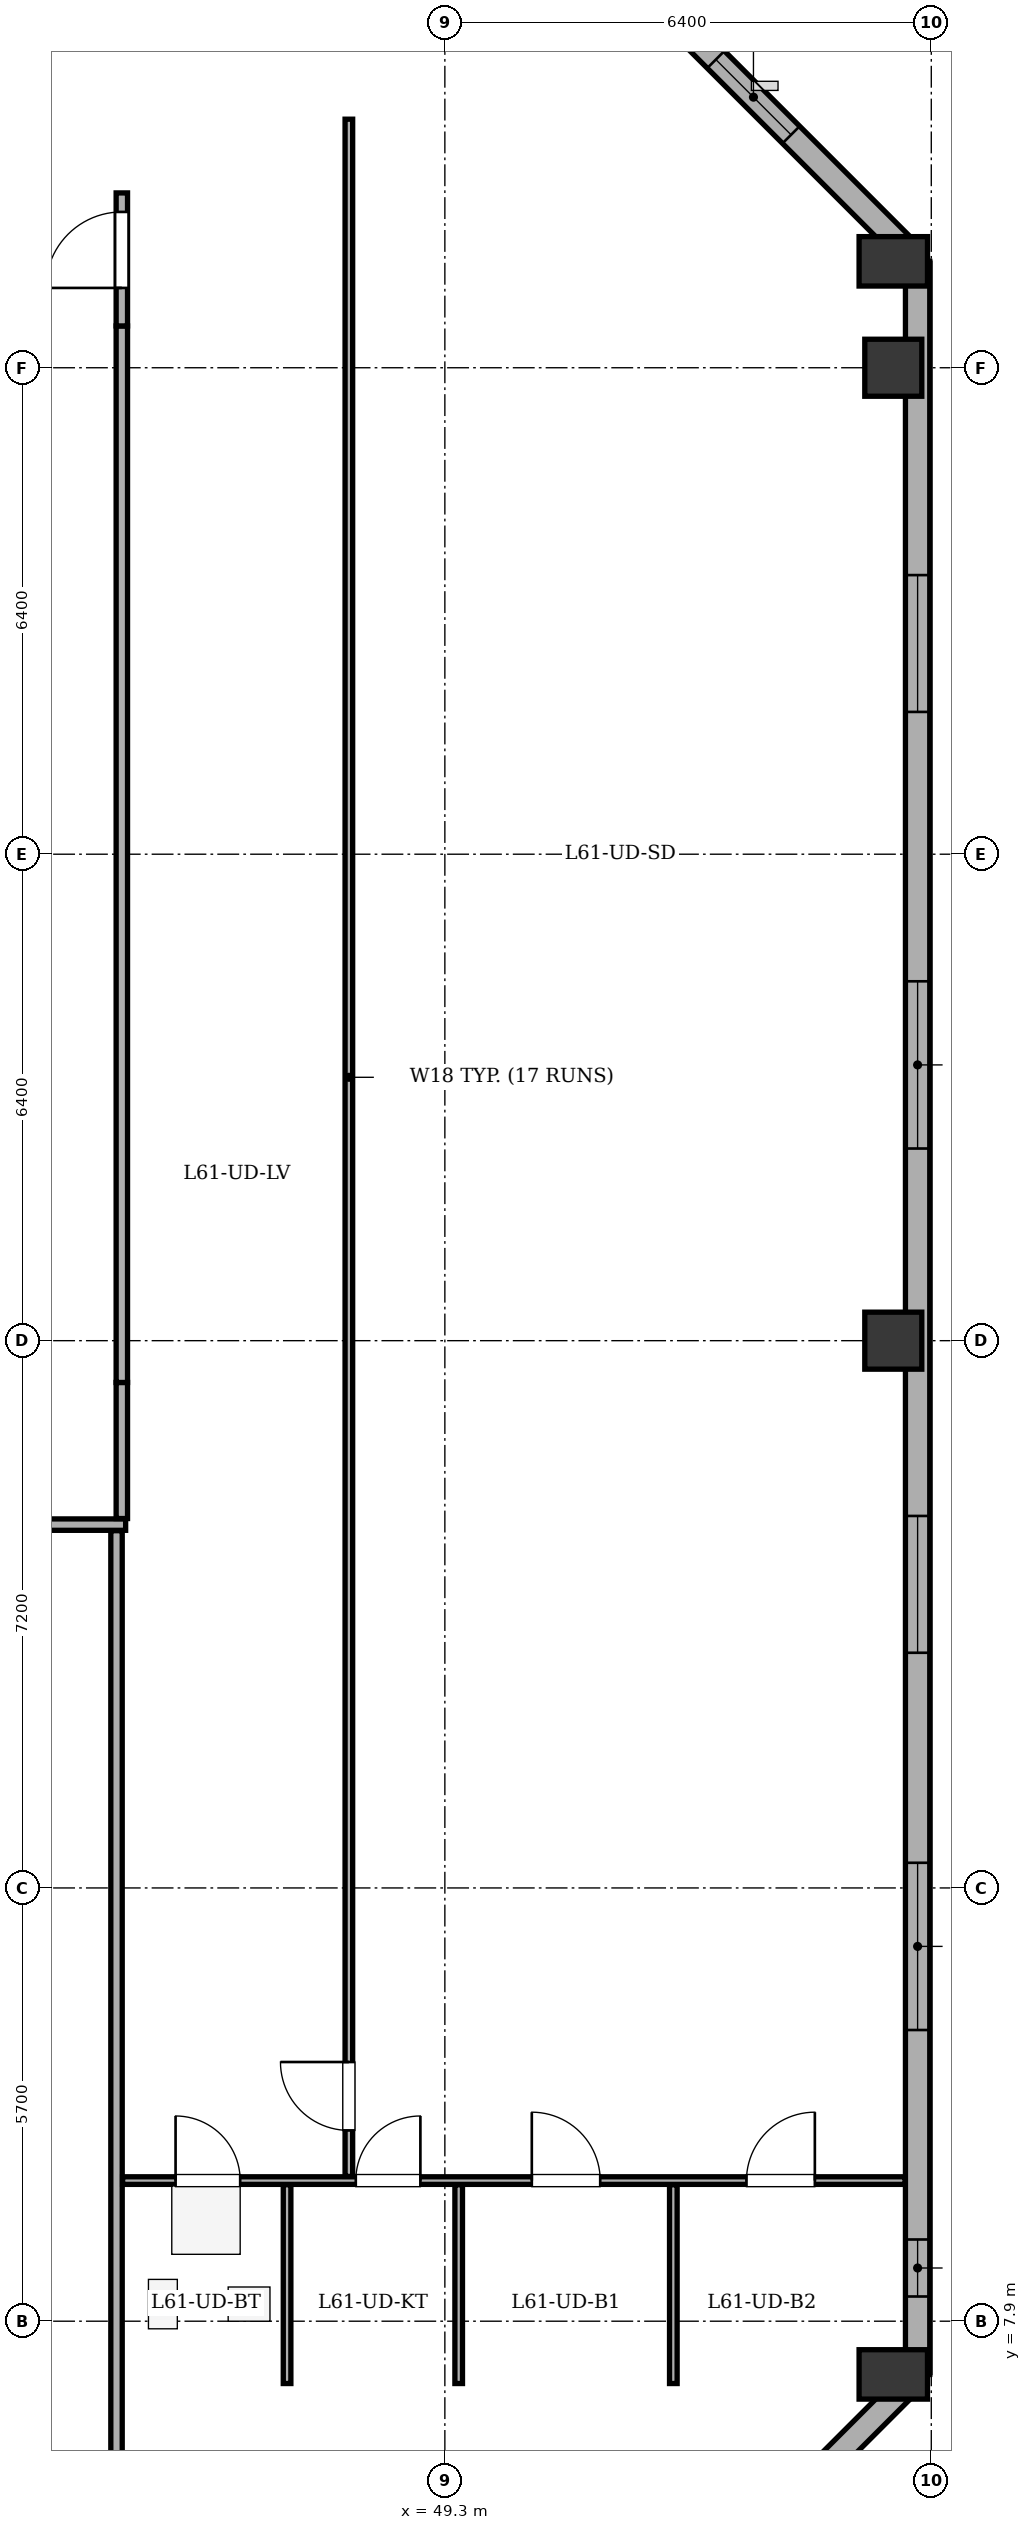
"""IFC4 building model, lengths in metres.
Left out: names, types, materials, properties, quantities, classifications, styles, units other than length and angle.
Written with IfcOpenShell. Run it as: python <this file> out.ifc"""

import sys

from ifc_helpers import new_model, si_unit, direction, frame, frame_2d, origin, origin_2d, place, context, subcontext, project, spatial, rectangle, extrude, element, fill, save


model = new_model("IFC4")
c1 = context("Model", 3, precision=1e-05, world=origin(), true_north=direction((0.0, 1.0)))
c2 = subcontext(c1, "Body", "Model", "MODEL_VIEW")
j1 = project(units=[si_unit("LENGTHUNIT", "METRE"), si_unit("PLANEANGLEUNIT", "RADIAN")], contexts=[c1])
p1 = place(None, origin())
s1 = spatial("IfcSite", under=j1, at=p1, CompositionType="ELEMENT")
p2 = place(p1, origin())
s2 = spatial("IfcBuilding", under=s1, at=p2, CompositionType="ELEMENT")
p3 = place(p2, frame((0.0, 0.0, 234.7)))
s3 = spatial("IfcBuildingStorey", under=s2, at=p3, CompositionType="ELEMENT", Elevation=234.7)
p4 = place(p3, frame((55.2, 7.2, 0.0), z_axis=(0.0, 0.0, 1.0), x_axis=(1.0, 0.0, 0.0)))
e1 = element("IfcColumn", 1, at=p4, inside=s3, PredefinedType="COLUMN", context=c2, shape_type="SweptSolid", body=[
    extrude(rectangle(XDim=0.65, YDim=0.9, at=origin_2d()), origin(), (0.0, 0.0, 1.0), 3.4),
])
for number, where, z_axis, x_axis in (
    (2, (55.2, 20.8, 0.0), (0.0, 0.0, 1.0), (1.0, 0.0, 0.0)),
    (3, (55.2, 33.6, 0.0), (0.0, 0.0, 1.0), (1.0, 0.0, 0.0)),
):
    element("IfcColumn", number, at=place(p3, frame(where, z_axis=z_axis, x_axis=x_axis)), inside=s3, PredefinedType="COLUMN", context=c2, shape_type="SweptSolid", body=[
        extrude(rectangle(XDim=0.75, YDim=0.75, at=origin_2d()), origin(), (0.0, 0.0, 1.0), 3.4),
    ])
p5 = place(p3, frame((55.2, 35.0, 0.0), z_axis=(0.0, 0.0, 1.0), x_axis=(1.0, 0.0, 0.0)))
e4 = element("IfcColumn", 4, at=p5, inside=s3, PredefinedType="COLUMN", context=c2, shape_type="SweptSolid", body=[
    extrude(rectangle(XDim=0.65, YDim=0.9, at=origin_2d()), origin(), (0.0, 0.0, 1.0), 3.4),
])
p6 = place(p3, frame((51.2, 39.32, 0.0), z_axis=(0.0, 0.0, 1.0), x_axis=(0.707106781187, -0.707106781187, 0.0)))
e5 = element("IfcWall", 5, at=p6, inside=s3, PredefinedType="STANDARD", context=c2, shape_type="SweptSolid", body=[
    extrude(rectangle(XDim=6.11, YDim=0.32, at=frame_2d((3.055, 0.0))), origin(), (0.0, 0.0, 1.0), 2.725),
])
p7 = place(p6, frame((2.355, 0.0, 0.75)))
e6 = element("IfcOpeningElement", 6, at=p7, cuts=e5, PredefinedType="OPENING", context=c2, shape_type="SweptSolid", body=[
    extrude(rectangle(XDim=1.4, YDim=1.65, at=frame_2d((0.7, 0.825))), frame((0.0, 0.17, 0.0), z_axis=(0.0, -1.0, 0.0), x_axis=(1.0, 0.0, 0.0)), (0.0, 0.0, 1.0), 0.34),
])
p8 = place(p3, frame((55.52, 35.0, 0.0), z_axis=(0.0, 0.0, 1.0), x_axis=(0.0, -1.0, 0.0)))
e7 = element("IfcWall", 7, at=p8, inside=s3, PredefinedType="STANDARD", context=c2, shape_type="SweptSolid", body=[
    extrude(rectangle(XDim=27.8, YDim=0.32, at=frame_2d((13.9, 0.0))), origin(), (0.0, 0.0, 1.0), 2.725),
])
p9 = place(p8, frame((4.128, 0.0, 0.75)))
e8 = element("IfcOpeningElement", 8, at=p9, cuts=e7, PredefinedType="OPENING", context=c2, shape_type="SweptSolid", body=[
    extrude(rectangle(XDim=1.8, YDim=1.7, at=frame_2d((0.9, 0.85))), frame((0.0, 0.17, 0.0), z_axis=(0.0, -1.0, 0.0), x_axis=(1.0, 0.0, 0.0)), (0.0, 0.0, 1.0), 0.34),
])
p10 = place(p8, frame((9.472, 0.0, 0.75)))
e9 = element("IfcOpeningElement", 9, at=p10, cuts=e7, PredefinedType="OPENING", context=c2, shape_type="SweptSolid", body=[
    extrude(rectangle(XDim=2.2, YDim=1.7, at=frame_2d((1.1, 0.85))), frame((0.0, 0.17, 0.0), z_axis=(0.0, -1.0, 0.0), x_axis=(1.0, 0.0, 0.0)), (0.0, 0.0, 1.0), 0.34),
])
p11 = place(p8, frame((16.506, 0.0, 0.75)))
e10 = element("IfcOpeningElement", 10, at=p11, cuts=e7, PredefinedType="OPENING", context=c2, shape_type="SweptSolid", body=[
    extrude(rectangle(XDim=1.8, YDim=1.7, at=frame_2d((0.9, 0.85))), frame((0.0, 0.17, 0.0), z_axis=(0.0, -1.0, 0.0), x_axis=(1.0, 0.0, 0.0)), (0.0, 0.0, 1.0), 0.34),
])
p12 = place(p8, frame((21.069, 0.0, 0.75)))
e11 = element("IfcOpeningElement", 11, at=p12, cuts=e7, PredefinedType="OPENING", context=c2, shape_type="SweptSolid", body=[
    extrude(rectangle(XDim=2.2, YDim=1.7, at=frame_2d((1.1, 0.85))), frame((0.0, 0.17, 0.0), z_axis=(0.0, -1.0, 0.0), x_axis=(1.0, 0.0, 0.0)), (0.0, 0.0, 1.0), 0.34),
])
p13 = place(p8, frame((26.025, 0.0, 0.75)))
e12 = element("IfcOpeningElement", 12, at=p13, cuts=e7, PredefinedType="OPENING", context=c2, shape_type="SweptSolid", body=[
    extrude(rectangle(XDim=0.75, YDim=1.45, at=frame_2d((0.375, 0.725))), frame((0.0, 0.17, 0.0), z_axis=(0.0, -1.0, 0.0), x_axis=(1.0, 0.0, 0.0)), (0.0, 0.0, 1.0), 0.34),
])
p14 = place(p3, frame((55.52, 7.2, 0.0), z_axis=(0.0, 0.0, 1.0), x_axis=(-0.707106781187, -0.707106781187, 0.0)))
e13 = element("IfcWall", 13, at=p14, inside=s3, PredefinedType="STANDARD", context=c2, shape_type="SweptSolid", body=[
    extrude(rectangle(XDim=6.11, YDim=0.32, at=frame_2d((3.055, 0.0))), origin(), (0.0, 0.0, 1.0), 2.725),
])
p15 = place(p14, frame((2.355, 0.0, 0.75)))
e14 = element("IfcOpeningElement", 14, at=p15, cuts=e13, PredefinedType="OPENING", context=c2, shape_type="SweptSolid", body=[
    extrude(rectangle(XDim=1.4, YDim=1.65, at=frame_2d((0.7, 0.825))), frame((0.0, 0.17, 0.0), z_axis=(0.0, -1.0, 0.0), x_axis=(1.0, 0.0, 0.0)), (0.0, 0.0, 1.0), 0.34),
])
p16 = place(p3, frame((15.08, 18.38, 0.0), z_axis=(0.0, 0.0, 1.0), x_axis=(1.0, 0.0, 0.0)))
e15 = element("IfcWall", 15, at=p16, inside=s3, PredefinedType="PARTITIONING", context=c2, shape_type="SweptSolid", body=[
    extrude(rectangle(XDim=30.02, YDim=0.15, at=frame_2d((15.01, 0.0))), origin(), (0.0, 0.0, 1.0), 3.1),
])
p17 = place(p16, frame((4.385, 0.0, 0.0)))
e16 = element("IfcOpeningElement", 16, at=p17, cuts=e15, PredefinedType="OPENING", context=c2, shape_type="SweptSolid", body=[
    extrude(rectangle(XDim=1.0, YDim=2.1, at=frame_2d((0.5, 1.05))), frame((0.0, 0.085, 0.0), z_axis=(0.0, -1.0, 0.0), x_axis=(1.0, 0.0, 0.0)), (0.0, 0.0, 1.0), 0.17),
])
p18 = place(p16, frame((14.361, 0.0, 0.0)))
e17 = element("IfcOpeningElement", 17, at=p18, cuts=e15, PredefinedType="OPENING", context=c2, shape_type="SweptSolid", body=[
    extrude(rectangle(XDim=1.0, YDim=2.1, at=frame_2d((0.5, 1.05))), frame((0.0, 0.085, 0.0), z_axis=(0.0, -1.0, 0.0), x_axis=(1.0, 0.0, 0.0)), (0.0, 0.0, 1.0), 0.17),
])
p19 = place(p16, frame((24.486, 0.0, 0.0)))
e18 = element("IfcOpeningElement", 18, at=p19, cuts=e15, PredefinedType="OPENING", context=c2, shape_type="SweptSolid", body=[
    extrude(rectangle(XDim=1.0, YDim=2.1, at=frame_2d((0.5, 1.05))), frame((0.0, 0.085, 0.0), z_axis=(0.0, -1.0, 0.0), x_axis=(1.0, 0.0, 0.0)), (0.0, 0.0, 1.0), 0.17),
])
p20 = place(p3, frame((44.98, 3.045, 0.0), z_axis=(0.0, 0.0, 1.0), x_axis=(0.0, 1.0, 0.0)))
e19 = element("IfcWall", 19, at=p20, inside=s3, PredefinedType="PARTITIONING", context=c2, shape_type="SweptSolid", body=[
    extrude(rectangle(XDim=15.255, YDim=0.15, at=frame_2d((7.627, 0.0))), origin(), (0.0, 0.0, 1.0), 2.725),
])
p21 = place(p3, frame((45.05, 18.46, 0.0), z_axis=(0.0, 0.0, 1.0), x_axis=(0.0, 1.0, 0.0)))
e20 = element("IfcWall", 20, at=p21, inside=s3, PredefinedType="PARTITIONING", context=c2, shape_type="SweptSolid", body=[
    extrude(rectangle(XDim=1.79, YDim=0.15, at=frame_2d((0.895, 0.0))), origin(), (0.0, 0.0, 1.0), 2.725),
])
p22 = place(p3, frame((45.05, 20.25, 0.0), z_axis=(0.0, 0.0, 1.0), x_axis=(0.0, 1.0, 0.0)))
e21 = element("IfcWall", 21, at=p22, inside=s3, PredefinedType="PARTITIONING", context=c2, shape_type="SweptSolid", body=[
    extrude(rectangle(XDim=13.9, YDim=0.15, at=frame_2d((6.95, 0.0))), origin(), (0.0, 0.0, 1.0), 2.725),
])
p23 = place(p3, frame((45.05, 34.15, 0.0), z_axis=(0.0, 0.0, 1.0), x_axis=(0.0, 1.0, 0.0)))
e22 = element("IfcWall", 22, at=p23, inside=s3, PredefinedType="PARTITIONING", context=c2, shape_type="SweptSolid", body=[
    extrude(rectangle(XDim=1.75, YDim=0.15, at=frame_2d((0.875, 0.0))), origin(), (0.0, 0.0, 1.0), 2.725),
])
p24 = place(p23, frame((0.5, 0.0, 0.0)))
e23 = element("IfcOpeningElement", 23, at=p24, cuts=e22, PredefinedType="OPENING", context=c2, shape_type="SweptSolid", body=[
    extrude(rectangle(XDim=1.0, YDim=2.1, at=frame_2d((0.5, 1.05))), frame((0.0, 0.085, 0.0), z_axis=(0.0, -1.0, 0.0), x_axis=(1.0, 0.0, 0.0)), (0.0, 0.0, 1.0), 0.17),
])
p25 = place(p3, frame((45.06, 9.75, 0.0), z_axis=(0.0, 0.0, 1.0), x_axis=(1.0, 0.0, 0.0)))
e24 = element("IfcWall", 24, at=p25, inside=s3, PredefinedType="PARTITIONING", context=c2, shape_type="SweptSolid", body=[
    extrude(rectangle(XDim=10.295, YDim=0.1, at=frame_2d((5.147, 0.0))), origin(), (0.0, 0.0, 1.0), 3.1),
])
p26 = place(p25, frame((0.697, 0.0, 0.0)))
e25 = element("IfcOpeningElement", 25, at=p26, cuts=e24, PredefinedType="OPENING", context=c2, shape_type="SweptSolid", body=[
    extrude(rectangle(XDim=0.85, YDim=2.05, at=frame_2d((0.425, 1.025))), frame((0.0, 0.06, 0.0), z_axis=(0.0, -1.0, 0.0), x_axis=(1.0, 0.0, 0.0)), (0.0, 0.0, 1.0), 0.12),
])
p27 = place(p25, frame((3.068, 0.0, 0.0)))
e26 = element("IfcOpeningElement", 26, at=p27, cuts=e24, PredefinedType="OPENING", context=c2, shape_type="SweptSolid", body=[
    extrude(rectangle(XDim=0.85, YDim=2.05, at=frame_2d((0.425, 1.025))), frame((0.0, 0.06, 0.0), z_axis=(0.0, -1.0, 0.0), x_axis=(1.0, 0.0, 0.0)), (0.0, 0.0, 1.0), 0.12),
])
p28 = place(p25, frame((5.384, 0.0, 0.0)))
e27 = element("IfcOpeningElement", 27, at=p28, cuts=e24, PredefinedType="OPENING", context=c2, shape_type="SweptSolid", body=[
    extrude(rectangle(XDim=0.9, YDim=2.05, at=frame_2d((0.45, 1.025))), frame((0.0, 0.06, 0.0), z_axis=(0.0, -1.0, 0.0), x_axis=(1.0, 0.0, 0.0)), (0.0, 0.0, 1.0), 0.12),
])
p29 = place(p25, frame((8.208, 0.0, 0.0)))
e28 = element("IfcOpeningElement", 28, at=p29, cuts=e24, PredefinedType="OPENING", context=c2, shape_type="SweptSolid", body=[
    extrude(rectangle(XDim=0.9, YDim=2.05, at=frame_2d((0.45, 1.025))), frame((0.0, 0.06, 0.0), z_axis=(0.0, -1.0, 0.0), x_axis=(1.0, 0.0, 0.0)), (0.0, 0.0, 1.0), 0.12),
])
p30 = place(p3, frame((48.037, 9.805, 0.0), z_axis=(0.0, 0.0, 1.0), x_axis=(0.0, 1.0, 0.0)))
e29 = element("IfcWall", 29, at=p30, inside=s3, PredefinedType="PARTITIONING", context=c2, shape_type="SweptSolid", body=[
    extrude(rectangle(XDim=27.065, YDim=0.1, at=frame_2d((13.533, 0.0))), origin(), (0.0, 0.0, 1.0), 3.1),
])
p31 = place(p30, frame((0.605, 0.0, 0.0)))
e30 = element("IfcOpeningElement", 30, at=p31, cuts=e29, PredefinedType="OPENING", context=c2, shape_type="SweptSolid", body=[
    extrude(rectangle(XDim=0.9, YDim=2.05, at=frame_2d((0.45, 1.025))), frame((0.0, 0.06, 0.0), z_axis=(0.0, -1.0, 0.0), x_axis=(1.0, 0.0, 0.0)), (0.0, 0.0, 1.0), 0.12),
])
for number, where, z_axis, x_axis in (
    (31, (47.224, 7.08, 0.0), (0.0, 0.0, 1.0), (0.0, 1.0, 0.0)),
    (32, (49.482, 7.08, 0.0), (0.0, 0.0, 1.0), (0.0, 1.0, 0.0)),
):
    element("IfcWall", number, at=place(p3, frame(where, z_axis=z_axis, x_axis=x_axis)), inside=s3, PredefinedType="PARTITIONING", context=c2, shape_type="SweptSolid", body=[
        extrude(rectangle(XDim=2.615, YDim=0.1, at=frame_2d((1.308, 0.0))), origin(), (0.0, 0.0, 1.0), 2.725),
    ])
p32 = place(p3, frame((52.306, 7.08, 0.0), z_axis=(0.0, 0.0, 1.0), x_axis=(0.0, 1.0, 0.0)))
e33 = element("IfcWall", 33, at=p32, inside=s3, PredefinedType="PARTITIONING", context=c2, shape_type="SweptSolid", body=[
    extrude(rectangle(XDim=2.615, YDim=0.1, at=frame_2d((1.308, 0.0))), origin(), (0.0, 0.0, 1.0), 3.1),
])
p33 = place(p9, origin())
e34 = element("IfcWindow", 34, at=p33, inside=s3, PartitioningType="SINGLE_PANEL", PredefinedType="WINDOW", context=c2, shape_type="SweptSolid", body=[
    extrude(rectangle(XDim=1.8, YDim=1.7, at=frame_2d((0.9, 0.85))), frame((0.0, -0.01, 0.0), z_axis=(0.0, -1.0, 0.0), x_axis=(1.0, 0.0, 0.0)), (0.0, 0.0, 1.0), 0.06),
])
fill(e8, e34)
p34 = place(p10, origin())
e35 = element("IfcWindow", 35, at=p34, inside=s3, PartitioningType="SINGLE_PANEL", PredefinedType="WINDOW", context=c2, shape_type="SweptSolid", body=[
    extrude(rectangle(XDim=2.2, YDim=1.7, at=frame_2d((1.1, 0.85))), frame((0.0, -0.01, 0.0), z_axis=(0.0, -1.0, 0.0), x_axis=(1.0, 0.0, 0.0)), (0.0, 0.0, 1.0), 0.06),
])
fill(e9, e35)
p35 = place(p11, origin())
e36 = element("IfcWindow", 36, at=p35, inside=s3, PartitioningType="SINGLE_PANEL", PredefinedType="WINDOW", context=c2, shape_type="SweptSolid", body=[
    extrude(rectangle(XDim=1.8, YDim=1.7, at=frame_2d((0.9, 0.85))), frame((0.0, -0.01, 0.0), z_axis=(0.0, -1.0, 0.0), x_axis=(1.0, 0.0, 0.0)), (0.0, 0.0, 1.0), 0.06),
])
fill(e10, e36)
p36 = place(p12, origin())
e37 = element("IfcWindow", 37, at=p36, inside=s3, PartitioningType="SINGLE_PANEL", PredefinedType="WINDOW", context=c2, shape_type="SweptSolid", body=[
    extrude(rectangle(XDim=2.2, YDim=1.7, at=frame_2d((1.1, 0.85))), frame((0.0, -0.01, 0.0), z_axis=(0.0, -1.0, 0.0), x_axis=(1.0, 0.0, 0.0)), (0.0, 0.0, 1.0), 0.06),
])
fill(e11, e37)
p37 = place(p13, origin())
e38 = element("IfcWindow", 38, at=p37, inside=s3, PartitioningType="SINGLE_PANEL", PredefinedType="WINDOW", context=c2, shape_type="SweptSolid", body=[
    extrude(rectangle(XDim=0.75, YDim=1.45, at=frame_2d((0.375, 0.725))), frame((0.0, -0.01, 0.0), z_axis=(0.0, -1.0, 0.0), x_axis=(1.0, 0.0, 0.0)), (0.0, 0.0, 1.0), 0.06),
])
fill(e12, e38)
p38 = place(p7, origin())
e39 = element("IfcWindow", 39, at=p38, inside=s3, PartitioningType="SINGLE_PANEL", PredefinedType="WINDOW", context=c2, shape_type="SweptSolid", body=[
    extrude(rectangle(XDim=1.4, YDim=1.65, at=frame_2d((0.7, 0.825))), frame((0.0, -0.01, 0.0), z_axis=(0.0, -1.0, 0.0), x_axis=(1.0, 0.0, 0.0)), (0.0, 0.0, 1.0), 0.06),
])
fill(e6, e39)
p39 = place(p24, origin())
e40 = element("IfcDoor", 40, at=p39, inside=s3, OperationType="SINGLE_SWING_LEFT", PredefinedType="DOOR", context=c2, shape_type="SweptSolid", body=[
    extrude(rectangle(XDim=1.0, YDim=2.1, at=frame_2d((0.5, 1.05))), frame((0.0, 0.025, 0.0), z_axis=(0.0, -1.0, 0.0), x_axis=(1.0, 0.0, 0.0)), (0.0, 0.0, 1.0), 0.05),
])
fill(e23, e40)
p40 = place(p31, origin())
e41 = element("IfcDoor", 41, at=p40, inside=s3, OperationType="SINGLE_SWING_RIGHT", PredefinedType="DOOR", context=c2, shape_type="SweptSolid", body=[
    extrude(rectangle(XDim=0.9, YDim=2.05, at=frame_2d((0.45, 1.025))), frame((0.0, 0.025, 0.0), z_axis=(0.0, -1.0, 0.0), x_axis=(1.0, 0.0, 0.0)), (0.0, 0.0, 1.0), 0.05),
])
fill(e30, e41)
p41 = place(p26, origin())
e42 = element("IfcDoor", 42, at=p41, inside=s3, OperationType="SINGLE_SWING_LEFT", PredefinedType="DOOR", context=c2, shape_type="SweptSolid", body=[
    extrude(rectangle(XDim=0.85, YDim=2.05, at=frame_2d((0.425, 1.025))), frame((0.0, 0.025, 0.0), z_axis=(0.0, -1.0, 0.0), x_axis=(1.0, 0.0, 0.0)), (0.0, 0.0, 1.0), 0.05),
])
fill(e25, e42)
p42 = place(p27, origin())
e43 = element("IfcDoor", 43, at=p42, inside=s3, OperationType="SINGLE_SWING_RIGHT", PredefinedType="DOOR", context=c2, shape_type="SweptSolid", body=[
    extrude(rectangle(XDim=0.85, YDim=2.05, at=frame_2d((0.425, 1.025))), frame((0.0, 0.025, 0.0), z_axis=(0.0, -1.0, 0.0), x_axis=(1.0, 0.0, 0.0)), (0.0, 0.0, 1.0), 0.05),
])
fill(e26, e43)
p43 = place(p28, origin())
e44 = element("IfcDoor", 44, at=p43, inside=s3, OperationType="SINGLE_SWING_LEFT", PredefinedType="DOOR", context=c2, shape_type="SweptSolid", body=[
    extrude(rectangle(XDim=0.9, YDim=2.05, at=frame_2d((0.45, 1.025))), frame((0.0, 0.025, 0.0), z_axis=(0.0, -1.0, 0.0), x_axis=(1.0, 0.0, 0.0)), (0.0, 0.0, 1.0), 0.05),
])
fill(e27, e44)
p44 = place(p29, origin())
e45 = element("IfcDoor", 45, at=p44, inside=s3, OperationType="SINGLE_SWING_RIGHT", PredefinedType="DOOR", context=c2, shape_type="SweptSolid", body=[
    extrude(rectangle(XDim=0.9, YDim=2.05, at=frame_2d((0.45, 1.025))), frame((0.0, 0.025, 0.0), z_axis=(0.0, -1.0, 0.0), x_axis=(1.0, 0.0, 0.0)), (0.0, 0.0, 1.0), 0.05),
])
fill(e28, e45)
save(model, sys.argv[1])
